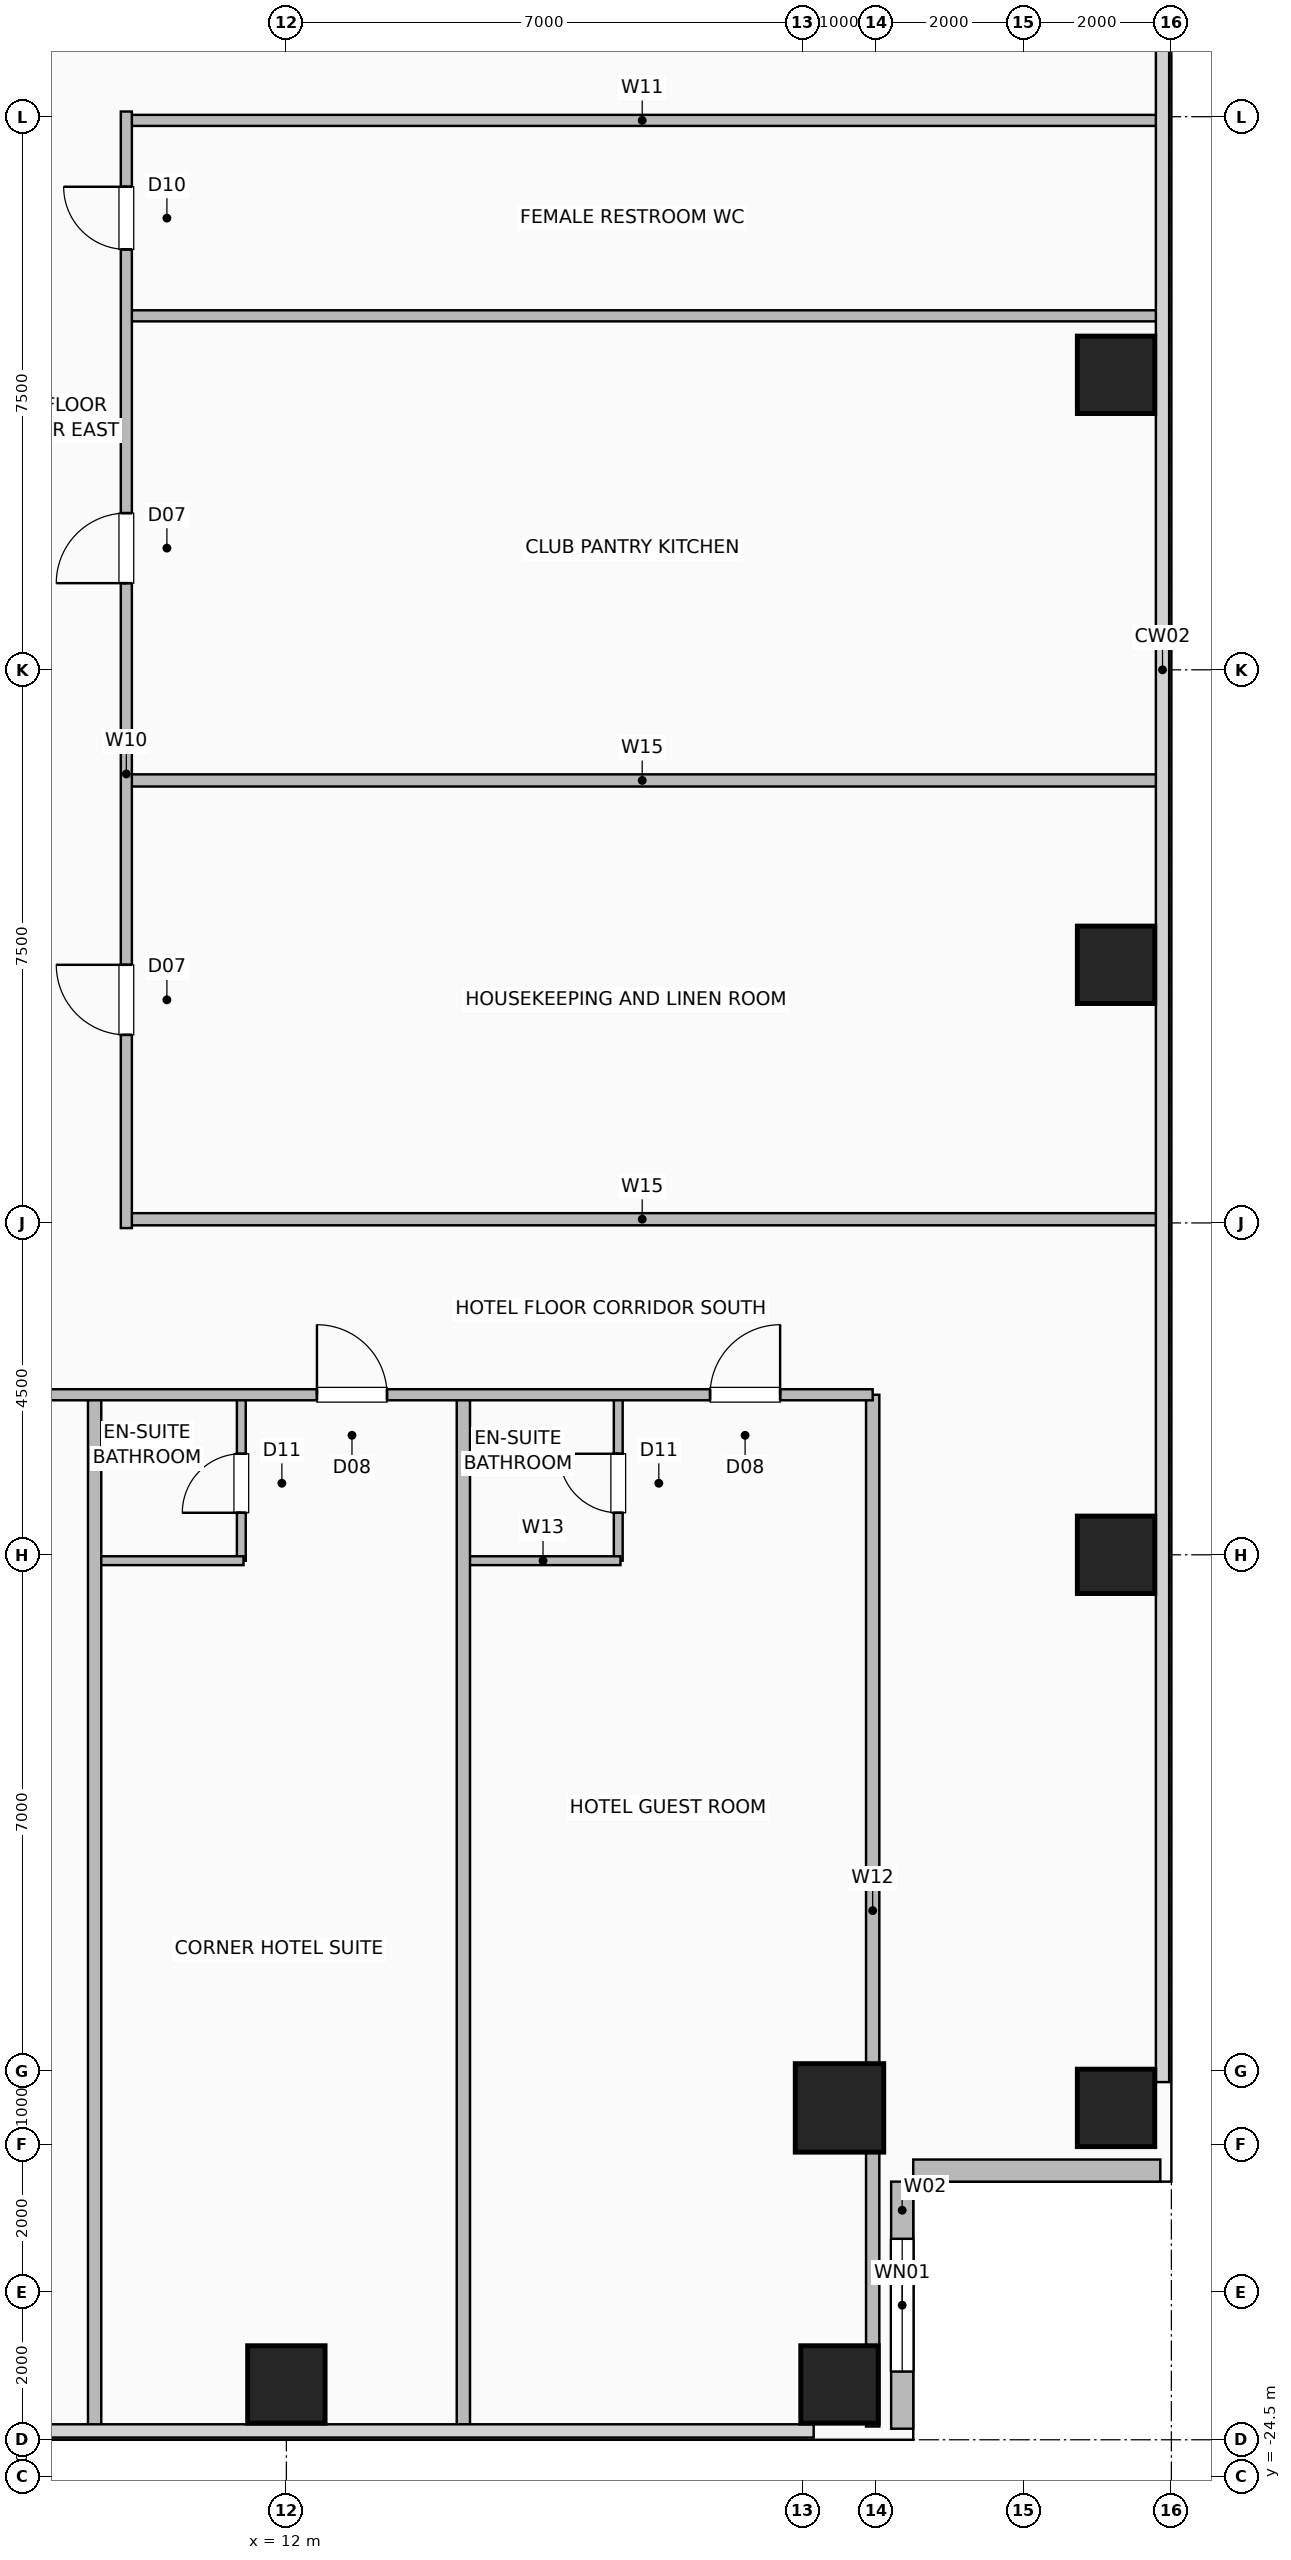
"""IFC4 building model, lengths in metres.
Left out: names, types, materials, properties, quantities, classifications, styles, units other than length and angle.
Written with IfcOpenShell. Run it as: python <this file> out.ifc"""

import sys

from ifc_helpers import new_model, si_unit, direction, frame, frame_2d, origin, origin_2d, place, context, subcontext, project, spatial, rectangle, hollow_rectangle, extrude, element, fill, save


model = new_model("IFC4")
c1 = context("Model", 3, precision=1e-05, world=origin(), true_north=direction((0.0, 1.0)))
c2 = subcontext(c1, "Body", "Model", "MODEL_VIEW")
j1 = project(units=[si_unit("LENGTHUNIT", "METRE"), si_unit("PLANEANGLEUNIT", "RADIAN")], contexts=[c1])
p1 = place(None, origin())
s1 = spatial("IfcSite", under=j1, at=p1, CompositionType="ELEMENT")
p2 = place(p1, origin())
s2 = spatial("IfcBuilding", under=s1, at=p2, CompositionType="ELEMENT")
p3 = place(p2, frame((0.0, 0.0, 62.0)))
s3 = spatial("IfcBuildingStorey", under=s2, at=p3, CompositionType="ELEMENT", Elevation=62.0)
for number, where, z_axis, x_axis in (
    (1, (23.25, -19.5, 0.0), (0.0, 0.0, 1.0), (1.0, 0.0, 0.0)),
    (2, (23.25, -12.0, 0.0), (0.0, 0.0, 1.0), (1.0, 0.0, 0.0)),
    (3, (23.25, -4.0, 0.0), (0.0, 0.0, 1.0), (1.0, 0.0, 0.0)),
    (4, (23.25, 4.0, 0.0), (0.0, 0.0, 1.0), (1.0, 0.0, 0.0)),
    (5, (12.0, -23.25, 0.0), (0.0, 0.0, 1.0), (1.0, 0.0, 0.0)),
    (6, (19.5, -23.25, 0.0), (0.0, 0.0, 1.0), (1.0, 0.0, 0.0)),
):
    element("IfcColumn", number, at=place(p3, frame(where, z_axis=z_axis, x_axis=x_axis)), inside=s3, PredefinedType="COLUMN", context=c2, shape_type="SweptSolid", body=[
        extrude(hollow_rectangle(XDim=1.05, YDim=1.05, WallThickness=0.05, at=origin_2d()), origin(), (0.0, 0.0, 1.0), 3.5),
    ])
p4 = place(p3, frame((19.5, -19.5, 0.0), z_axis=(0.0, 0.0, 1.0), x_axis=(1.0, 0.0, 0.0)))
e7 = element("IfcColumn", 7, at=p4, inside=s3, PredefinedType="COLUMN", context=c2, shape_type="SweptSolid", body=[
    extrude(hollow_rectangle(XDim=1.2, YDim=1.2, WallThickness=0.055, at=origin_2d()), origin(), (0.0, 0.0, 1.0), 3.5),
])
p5 = place(p3, frame((20.35, -23.85, 0.0), z_axis=(0.0, 0.0, 1.0), x_axis=(0.0, 1.0, 0.0)))
e8 = element("IfcWall", 8, at=p5, inside=s3, PredefinedType="SOLIDWALL", context=c2, shape_type="SweptSolid", body=[
    extrude(rectangle(XDim=3.35, YDim=0.3, at=frame_2d((1.675, 0.0))), origin(), (0.0, 0.0, 1.0), 3.25),
])
p6 = place(p5, frame((0.775, 0.0, 0.9)))
e9 = element("IfcOpeningElement", 9, at=p6, cuts=e8, PredefinedType="OPENING", context=c2, shape_type="SweptSolid", body=[
    extrude(rectangle(XDim=1.8, YDim=1.8, at=frame_2d((0.9, 0.9))), frame((0.0, 0.16, 0.0), z_axis=(0.0, -1.0, 0.0), x_axis=(1.0, 0.0, 0.0)), (0.0, 0.0, 1.0), 0.32),
])
p7 = place(p3, frame((23.85, -20.35, 0.0), z_axis=(0.0, 0.0, 1.0), x_axis=(-1.0, 0.0, 0.0)))
e10 = element("IfcWall", 10, at=p7, inside=s3, PredefinedType="SOLIDWALL", context=c2, shape_type="SweptSolid", body=[
    extrude(rectangle(XDim=3.35, YDim=0.3, at=frame_2d((1.675, 0.0))), origin(), (0.0, 0.0, 1.0), 3.25),
])
p8 = place(p3, frame((11.389, -12.08, 0.0), z_axis=(0.0, 0.0, 1.0), x_axis=(0.0, 1.0, 0.0)))
e11 = element("IfcWall", 11, at=p8, inside=s3, PredefinedType="PLUMBINGWALL", context=c2, shape_type="SweptSolid", body=[
    extrude(rectangle(XDim=2.25, YDim=0.12, at=frame_2d((1.125, 0.0))), origin(), (0.0, 0.0, 1.0), 3.25),
])
p9 = place(p8, frame((0.65, 0.0, 0.0)))
e12 = element("IfcOpeningElement", 12, at=p9, cuts=e11, PredefinedType="OPENING", context=c2, shape_type="SweptSolid", body=[
    extrude(rectangle(XDim=0.8, YDim=2.05, at=frame_2d((0.4, 1.025))), frame((0.0, 0.07, 0.0), z_axis=(0.0, -1.0, 0.0), x_axis=(1.0, 0.0, 0.0)), (0.0, 0.0, 1.0), 0.14),
])
p10 = place(p3, frame((9.43, -12.08, 0.0), z_axis=(0.0, 0.0, 1.0), x_axis=(1.0, 0.0, 0.0)))
e13 = element("IfcWall", 13, at=p10, inside=s3, PredefinedType="PLUMBINGWALL", context=c2, shape_type="SweptSolid", body=[
    extrude(rectangle(XDim=1.989, YDim=0.12, at=frame_2d((0.995, 0.0))), origin(), (0.0, 0.0, 1.0), 3.25),
])
p11 = place(p3, frame((16.5, -12.08, 0.0), z_axis=(0.0, 0.0, 1.0), x_axis=(0.0, 1.0, 0.0)))
e14 = element("IfcWall", 14, at=p11, inside=s3, PredefinedType="PLUMBINGWALL", context=c2, shape_type="SweptSolid", body=[
    extrude(rectangle(XDim=2.25, YDim=0.12, at=frame_2d((1.125, 0.0))), origin(), (0.0, 0.0, 1.0), 3.25),
])
p12 = place(p11, frame((0.65, 0.0, 0.0)))
e15 = element("IfcOpeningElement", 15, at=p12, cuts=e14, PredefinedType="OPENING", context=c2, shape_type="SweptSolid", body=[
    extrude(rectangle(XDim=0.8, YDim=2.05, at=frame_2d((0.4, 1.025))), frame((0.0, 0.07, 0.0), z_axis=(0.0, -1.0, 0.0), x_axis=(1.0, 0.0, 0.0)), (0.0, 0.0, 1.0), 0.14),
])
p13 = place(p3, frame((14.43, -12.08, 0.0), z_axis=(0.0, 0.0, 1.0), x_axis=(1.0, 0.0, 0.0)))
e16 = element("IfcWall", 16, at=p13, inside=s3, PredefinedType="PLUMBINGWALL", context=c2, shape_type="SweptSolid", body=[
    extrude(rectangle(XDim=2.1, YDim=0.12, at=frame_2d((1.05, 0.0))), origin(), (0.0, 0.0, 1.0), 3.25),
])
for number, where, z_axis, x_axis in (
    (17, (9.4, -23.82, 0.0), (0.0, 0.0, 1.0), (0.0, 1.0, 0.0)),
    (18, (14.4, -23.82, 0.0), (0.0, 0.0, 1.0), (0.0, 1.0, 0.0)),
    (19, (19.95, -23.82, 0.0), (0.0, 0.0, 1.0), (0.0, 1.0, 0.0)),
):
    element("IfcWall", number, at=place(p3, frame(where, z_axis=z_axis, x_axis=x_axis)), inside=s3, PredefinedType="PARTITIONING", context=c2, shape_type="SweptSolid", body=[
        extrude(rectangle(XDim=13.99, YDim=0.18, at=frame_2d((6.995, 0.0))), origin(), (0.0, 0.0, 1.0), 3.25),
    ])
p14 = place(p3, frame((-19.95, -9.83, 0.0), z_axis=(0.0, 0.0, 1.0), x_axis=(1.0, 0.0, 0.0)))
e20 = element("IfcWall", 20, at=p14, inside=s3, PredefinedType="PARTITIONING", context=c2, shape_type="SweptSolid", body=[
    extrude(rectangle(XDim=39.9, YDim=0.15, at=frame_2d((19.95, 0.0))), origin(), (0.0, 0.0, 1.0), 3.25),
])
p15 = place(p14, frame((3.245, 0.0, 0.0)))
e21 = element("IfcOpeningElement", 21, at=p15, cuts=e20, PredefinedType="OPENING", context=c2, shape_type="SweptSolid", body=[
    extrude(rectangle(XDim=0.95, YDim=2.08, at=frame_2d((0.475, 1.04))), frame((0.0, 0.085, 0.0), z_axis=(0.0, -1.0, 0.0), x_axis=(1.0, 0.0, 0.0)), (0.0, 0.0, 1.0), 0.17),
])
p16 = place(p14, frame((8.227, 0.0, 0.0)))
e22 = element("IfcOpeningElement", 22, at=p16, cuts=e20, PredefinedType="OPENING", context=c2, shape_type="SweptSolid", body=[
    extrude(rectangle(XDim=0.95, YDim=2.08, at=frame_2d((0.475, 1.04))), frame((0.0, 0.085, 0.0), z_axis=(0.0, -1.0, 0.0), x_axis=(1.0, 0.0, 0.0)), (0.0, 0.0, 1.0), 0.17),
])
p17 = place(p14, frame((13.027, 0.0, 0.0)))
e23 = element("IfcOpeningElement", 23, at=p17, cuts=e20, PredefinedType="OPENING", context=c2, shape_type="SweptSolid", body=[
    extrude(rectangle(XDim=0.95, YDim=2.08, at=frame_2d((0.475, 1.04))), frame((0.0, 0.085, 0.0), z_axis=(0.0, -1.0, 0.0), x_axis=(1.0, 0.0, 0.0)), (0.0, 0.0, 1.0), 0.17),
])
p18 = place(p14, frame((16.861, 0.0, 0.0)))
e24 = element("IfcOpeningElement", 24, at=p18, cuts=e20, PredefinedType="OPENING", context=c2, shape_type="SweptSolid", body=[
    extrude(rectangle(XDim=0.95, YDim=2.08, at=frame_2d((0.475, 1.04))), frame((0.0, 0.085, 0.0), z_axis=(0.0, -1.0, 0.0), x_axis=(1.0, 0.0, 0.0)), (0.0, 0.0, 1.0), 0.17),
])
p19 = place(p14, frame((22.02, 0.0, 0.0)))
e25 = element("IfcOpeningElement", 25, at=p19, cuts=e20, PredefinedType="OPENING", context=c2, shape_type="SweptSolid", body=[
    extrude(rectangle(XDim=0.95, YDim=2.08, at=frame_2d((0.475, 1.04))), frame((0.0, 0.085, 0.0), z_axis=(0.0, -1.0, 0.0), x_axis=(1.0, 0.0, 0.0)), (0.0, 0.0, 1.0), 0.17),
])
p20 = place(p14, frame((27.427, 0.0, 0.0)))
e26 = element("IfcOpeningElement", 26, at=p20, cuts=e20, PredefinedType="OPENING", context=c2, shape_type="SweptSolid", body=[
    extrude(rectangle(XDim=0.95, YDim=2.08, at=frame_2d((0.475, 1.04))), frame((0.0, 0.085, 0.0), z_axis=(0.0, -1.0, 0.0), x_axis=(1.0, 0.0, 0.0)), (0.0, 0.0, 1.0), 0.17),
])
p21 = place(p14, frame((32.365, 0.0, 0.0)))
e27 = element("IfcOpeningElement", 27, at=p21, cuts=e20, PredefinedType="OPENING", context=c2, shape_type="SweptSolid", body=[
    extrude(rectangle(XDim=0.95, YDim=2.08, at=frame_2d((0.475, 1.04))), frame((0.0, 0.085, 0.0), z_axis=(0.0, -1.0, 0.0), x_axis=(1.0, 0.0, 0.0)), (0.0, 0.0, 1.0), 0.17),
])
p22 = place(p14, frame((37.695, 0.0, 0.0)))
e28 = element("IfcOpeningElement", 28, at=p22, cuts=e20, PredefinedType="OPENING", context=c2, shape_type="SweptSolid", body=[
    extrude(rectangle(XDim=0.95, YDim=2.08, at=frame_2d((0.475, 1.04))), frame((0.0, 0.085, 0.0), z_axis=(0.0, -1.0, 0.0), x_axis=(1.0, 0.0, 0.0)), (0.0, 0.0, 1.0), 0.17),
])
for number, where, z_axis, x_axis in (
    (29, (9.83, -7.45, 0.0), (0.0, 0.0, 1.0), (1.0, 0.0, 0.0)),
    (30, (9.83, -1.5, 0.0), (0.0, 0.0, 1.0), (1.0, 0.0, 0.0)),
):
    element("IfcWall", number, at=place(p3, frame(where, z_axis=z_axis, x_axis=x_axis)), inside=s3, PredefinedType="PLUMBINGWALL", context=c2, shape_type="SweptSolid", body=[
        extrude(rectangle(XDim=13.99, YDim=0.165, at=frame_2d((6.995, 0.0))), origin(), (0.0, 0.0, 1.0), 3.25),
    ])
p23 = place(p3, frame((9.83, 4.8, 0.0), z_axis=(0.0, 0.0, 1.0), x_axis=(1.0, 0.0, 0.0)))
e31 = element("IfcWall", 31, at=p23, inside=s3, PredefinedType="PARTITIONING", context=c2, shape_type="SweptSolid", body=[
    extrude(rectangle(XDim=13.99, YDim=0.15, at=frame_2d((6.995, 0.0))), origin(), (0.0, 0.0, 1.0), 2.818),
])
p24 = place(p3, frame((9.83, 7.45, 0.0), z_axis=(0.0, 0.0, 1.0), x_axis=(1.0, 0.0, 0.0)))
e32 = element("IfcWall", 32, at=p24, inside=s3, PredefinedType="PARTITIONING", context=c2, shape_type="SweptSolid", body=[
    extrude(rectangle(XDim=13.99, YDim=0.15, at=frame_2d((6.995, 0.0))), origin(), (0.0, 0.0, 1.0), 3.25),
])
p25 = place(p3, frame((9.83, -7.57, 0.0), z_axis=(0.0, 0.0, 1.0), x_axis=(0.0, 1.0, 0.0)))
e33 = element("IfcWall", 33, at=p25, inside=s3, PredefinedType="PARTITIONING", context=c2, shape_type="SweptSolid", body=[
    extrude(rectangle(XDim=15.14, YDim=0.15, at=frame_2d((7.57, 0.0))), origin(), (0.0, 0.0, 1.0), 3.25),
])
p26 = place(p25, frame((2.62, 0.0, 0.0)))
e34 = element("IfcOpeningElement", 34, at=p26, cuts=e33, PredefinedType="OPENING", context=c2, shape_type="SweptSolid", body=[
    extrude(rectangle(XDim=0.95, YDim=2.06, at=frame_2d((0.475, 1.03))), frame((0.0, 0.085, 0.0), z_axis=(0.0, -1.0, 0.0), x_axis=(1.0, 0.0, 0.0)), (0.0, 0.0, 1.0), 0.17),
])
p27 = place(p25, frame((8.745, 0.0, 0.0)))
e35 = element("IfcOpeningElement", 35, at=p27, cuts=e33, PredefinedType="OPENING", context=c2, shape_type="SweptSolid", body=[
    extrude(rectangle(XDim=0.95, YDim=2.06, at=frame_2d((0.475, 1.03))), frame((0.0, 0.085, 0.0), z_axis=(0.0, -1.0, 0.0), x_axis=(1.0, 0.0, 0.0)), (0.0, 0.0, 1.0), 0.17),
])
p28 = place(p25, frame((13.27, 0.0, 0.0)))
e36 = element("IfcOpeningElement", 36, at=p28, cuts=e33, PredefinedType="OPENING", context=c2, shape_type="SweptSolid", body=[
    extrude(rectangle(XDim=0.85, YDim=2.05, at=frame_2d((0.425, 1.025))), frame((0.0, 0.085, 0.0), z_axis=(0.0, -1.0, 0.0), x_axis=(1.0, 0.0, 0.0)), (0.0, 0.0, 1.0), 0.17),
])
p29 = place(p6, origin())
e37 = element("IfcWindow", 37, at=p29, inside=s3, PartitioningType="SINGLE_PANEL", PredefinedType="WINDOW", context=c2, shape_type="SweptSolid", body=[
    extrude(rectangle(XDim=1.8, YDim=1.8, at=frame_2d((0.9, 0.9))), frame((0.0, 0.03, 0.0), z_axis=(0.0, -1.0, 0.0), x_axis=(1.0, 0.0, 0.0)), (0.0, 0.0, 1.0), 0.06),
])
fill(e9, e37)
p30 = place(p9, origin())
e38 = element("IfcDoor", 38, at=p30, inside=s3, OperationType="SINGLE_SWING_LEFT", PredefinedType="DOOR", context=c2, shape_type="SweptSolid", body=[
    extrude(rectangle(XDim=0.8, YDim=2.05, at=frame_2d((0.4, 1.025))), frame((0.0, 0.025, 0.0), z_axis=(0.0, -1.0, 0.0), x_axis=(1.0, 0.0, 0.0)), (0.0, 0.0, 1.0), 0.05),
])
fill(e12, e38)
p31 = place(p12, origin())
e39 = element("IfcDoor", 39, at=p31, inside=s3, OperationType="SINGLE_SWING_RIGHT", PredefinedType="DOOR", context=c2, shape_type="SweptSolid", body=[
    extrude(rectangle(XDim=0.8, YDim=2.05, at=frame_2d((0.4, 1.025))), frame((0.0, 0.025, 0.0), z_axis=(0.0, -1.0, 0.0), x_axis=(1.0, 0.0, 0.0)), (0.0, 0.0, 1.0), 0.05),
])
fill(e15, e39)
p32 = place(p21, origin())
e40 = element("IfcDoor", 40, at=p32, inside=s3, OperationType="SINGLE_SWING_LEFT", PredefinedType="DOOR", context=c2, shape_type="SweptSolid", body=[
    extrude(rectangle(XDim=0.95, YDim=2.08, at=frame_2d((0.475, 1.04))), frame((0.0, 0.025, 0.0), z_axis=(0.0, -1.0, 0.0), x_axis=(1.0, 0.0, 0.0)), (0.0, 0.0, 1.0), 0.05),
])
fill(e27, e40)
p33 = place(p22, origin())
e41 = element("IfcDoor", 41, at=p33, inside=s3, OperationType="SINGLE_SWING_RIGHT", PredefinedType="DOOR", context=c2, shape_type="SweptSolid", body=[
    extrude(rectangle(XDim=0.95, YDim=2.08, at=frame_2d((0.475, 1.04))), frame((0.0, 0.025, 0.0), z_axis=(0.0, -1.0, 0.0), x_axis=(1.0, 0.0, 0.0)), (0.0, 0.0, 1.0), 0.05),
])
fill(e28, e41)
p34 = place(p26, origin())
e42 = element("IfcDoor", 42, at=p34, inside=s3, OperationType="SINGLE_SWING_RIGHT", PredefinedType="DOOR", context=c2, shape_type="SweptSolid", body=[
    extrude(rectangle(XDim=0.95, YDim=2.06, at=frame_2d((0.475, 1.03))), frame((0.0, 0.025, 0.0), z_axis=(0.0, -1.0, 0.0), x_axis=(1.0, 0.0, 0.0)), (0.0, 0.0, 1.0), 0.05),
])
fill(e34, e42)
p35 = place(p27, origin())
e43 = element("IfcDoor", 43, at=p35, inside=s3, OperationType="SINGLE_SWING_LEFT", PredefinedType="DOOR", context=c2, shape_type="SweptSolid", body=[
    extrude(rectangle(XDim=0.95, YDim=2.06, at=frame_2d((0.475, 1.03))), frame((0.0, 0.025, 0.0), z_axis=(0.0, -1.0, 0.0), x_axis=(1.0, 0.0, 0.0)), (0.0, 0.0, 1.0), 0.05),
])
fill(e35, e43)
p36 = place(p28, origin())
e44 = element("IfcDoor", 44, at=p36, inside=s3, OperationType="SINGLE_SWING_RIGHT", PredefinedType="DOOR", context=c2, shape_type="SweptSolid", body=[
    extrude(rectangle(XDim=0.85, YDim=2.05, at=frame_2d((0.425, 1.025))), frame((0.0, 0.025, 0.0), z_axis=(0.0, -1.0, 0.0), x_axis=(1.0, 0.0, 0.0)), (0.0, 0.0, 1.0), 0.05),
])
fill(e36, e44)
save(model, sys.argv[1])
